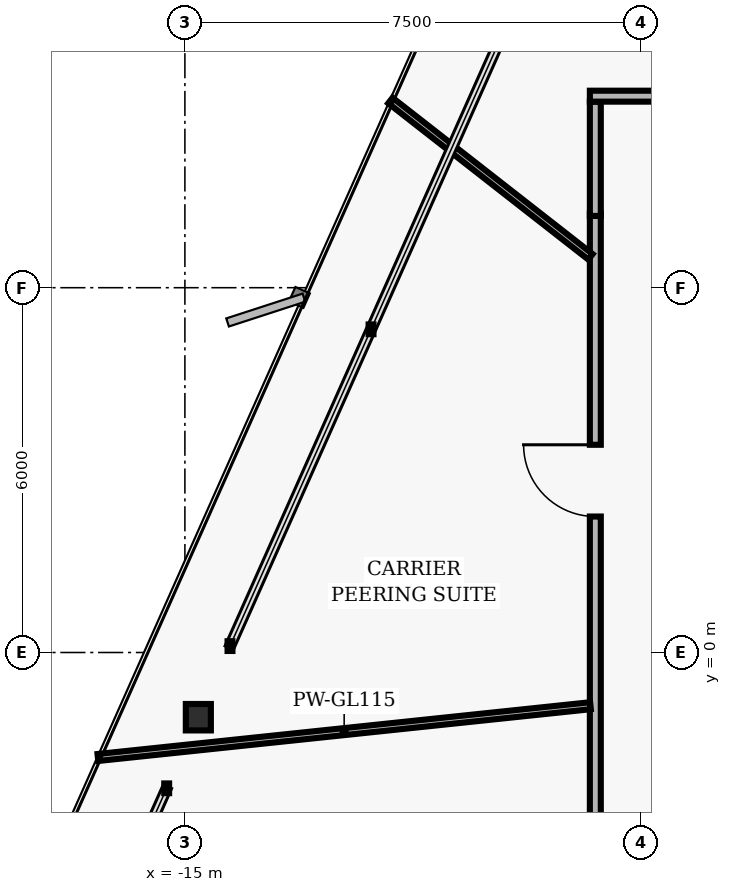
"""IFC4 building model, lengths in metres.
Left out: names, types, materials, properties, quantities, classifications, styles, units other than length and angle.
Written with IfcOpenShell. Run it as: python <this file> out.ifc"""

import sys

from ifc_helpers import new_model, si_unit, direction, frame, frame_2d, origin, origin_2d, place, context, subcontext, project, spatial, rectangle, i_section, extrude, element, fill, save


model = new_model("IFC4")
c1 = context("Model", 3, precision=1e-05, world=origin(), true_north=direction((0.0, 1.0)))
c2 = subcontext(c1, "Body", "Model", "MODEL_VIEW")
j1 = project(units=[si_unit("LENGTHUNIT", "METRE"), si_unit("PLANEANGLEUNIT", "RADIAN")], contexts=[c1])
p1 = place(None, origin())
s1 = spatial("IfcSite", under=j1, at=p1, CompositionType="ELEMENT")
p2 = place(p1, origin())
s2 = spatial("IfcBuilding", under=s1, at=p2, CompositionType="ELEMENT")
p3 = place(p2, frame((0.0, 0.0, 104.64)))
s3 = spatial("IfcBuildingStorey", under=s2, at=p3, CompositionType="ELEMENT", Elevation=104.64)
p4 = place(p3, frame((-14.779, -1.064, 0.0), z_axis=(0.0, 0.0, 1.0), x_axis=(1.0, 0.0, 0.0)))
e1 = element("IfcColumn", 1, at=p4, inside=s3, PredefinedType="COLUMN", context=c2, shape_type="SweptSolid", body=[
    extrude(i_section(OverallWidth=0.412, OverallDepth=0.435, WebThickness=0.036, FlangeThickness=0.057, FilletRadius=0.022, at=origin_2d()), origin(), (0.0, 0.0, 1.0), 3.04),
])
p5 = place(p3, frame((-8.25, -7.22, 0.0), z_axis=(0.0, 0.0, 1.0), x_axis=(0.0, 1.0, 0.0)))
e2 = element("IfcWall", 2, at=p5, inside=s3, PredefinedType="PARTITIONING", context=c2, shape_type="SweptSolid", body=[
    extrude(rectangle(XDim=14.44, YDim=0.18, at=frame_2d((7.22, 0.0))), origin(), (0.0, 0.0, 1.0), 2.33),
])
p6 = place(p5, frame((3.038, 0.0, 0.0)))
e3 = element("IfcOpeningElement", 3, at=p6, cuts=e2, PredefinedType="OPENING", context=c2, shape_type="SweptSolid", body=[
    extrude(rectangle(XDim=0.96, YDim=2.02, at=frame_2d((0.48, 1.01))), frame((0.0, 0.1, 0.0), z_axis=(0.0, -1.0, 0.0), x_axis=(1.0, 0.0, 0.0)), (0.0, 0.0, 1.0), 0.2),
])
p7 = place(p5, frame((9.456, 0.0, 0.0)))
e4 = element("IfcOpeningElement", 4, at=p7, cuts=e2, PredefinedType="OPENING", context=c2, shape_type="SweptSolid", body=[
    extrude(rectangle(XDim=1.18, YDim=2.02, at=frame_2d((0.59, 1.01))), frame((0.0, 0.1, 0.0), z_axis=(0.0, -1.0, 0.0), x_axis=(1.0, 0.0, 0.0)), (0.0, 0.0, 1.0), 0.2),
])
p8 = place(p3, frame((-8.25, 7.18, 0.0), z_axis=(0.0, 0.0, 1.0), x_axis=(0.0, 1.0, 0.0)))
e5 = element("IfcWall", 5, at=p8, inside=s3, PredefinedType="PARTITIONING", context=c2, shape_type="SweptSolid", body=[
    extrude(rectangle(XDim=1.88, YDim=0.18, at=frame_2d((0.94, 0.0))), origin(), (0.0, 0.0, 1.0), 2.763),
])
p9 = place(p3, frame((-8.34, 9.15, 0.0), z_axis=(0.0, 0.0, 1.0), x_axis=(1.0, 0.0, 0.0)))
e6 = element("IfcWall", 6, at=p9, inside=s3, PredefinedType="PARTITIONING", context=c2, shape_type="SweptSolid", body=[
    extrude(rectangle(XDim=1.86, YDim=0.18, at=frame_2d((0.93, 0.0))), origin(), (0.0, 0.0, 1.0), 2.763),
])
p10 = place(p3, frame((-8.33, -0.875, 0.0), z_axis=(0.0, 0.0, 1.0), x_axis=(-0.994520879121, -0.104538131765, 0.0)))
e7 = element("IfcWall", 7, at=p10, inside=s3, PredefinedType="MOVABLE", context=c2, shape_type="SweptSolid", body=[
    extrude(rectangle(XDim=8.146, YDim=0.115, at=frame_2d((4.073, 0.0))), origin(), (0.0, 0.0, 1.0), 2.763),
])
p11 = place(p3, frame((-8.33, 6.508, 0.0), z_axis=(0.0, 0.0, 1.0), x_axis=(-0.787993347372, 0.615683753641, 0.0)))
e8 = element("IfcWall", 8, at=p11, inside=s3, PredefinedType="MOVABLE", context=c2, shape_type="SweptSolid", body=[
    extrude(rectangle(XDim=4.176, YDim=0.115, at=frame_2d((2.088, 0.0))), origin(), (0.0, 0.0, 1.0), 2.763),
])
p12 = place(p7, origin())
e9 = element("IfcDoor", 9, at=p12, inside=s3, OperationType="SINGLE_SWING_RIGHT", PredefinedType="DOOR", context=c2, shape_type="SweptSolid", body=[
    extrude(rectangle(XDim=1.18, YDim=2.02, at=frame_2d((0.59, 1.01))), frame((0.0, 0.025, 0.0), z_axis=(0.0, -1.0, 0.0), x_axis=(1.0, 0.0, 0.0)), (0.0, 0.0, 1.0), 0.05),
])
fill(e4, e9)
save(model, sys.argv[1])
